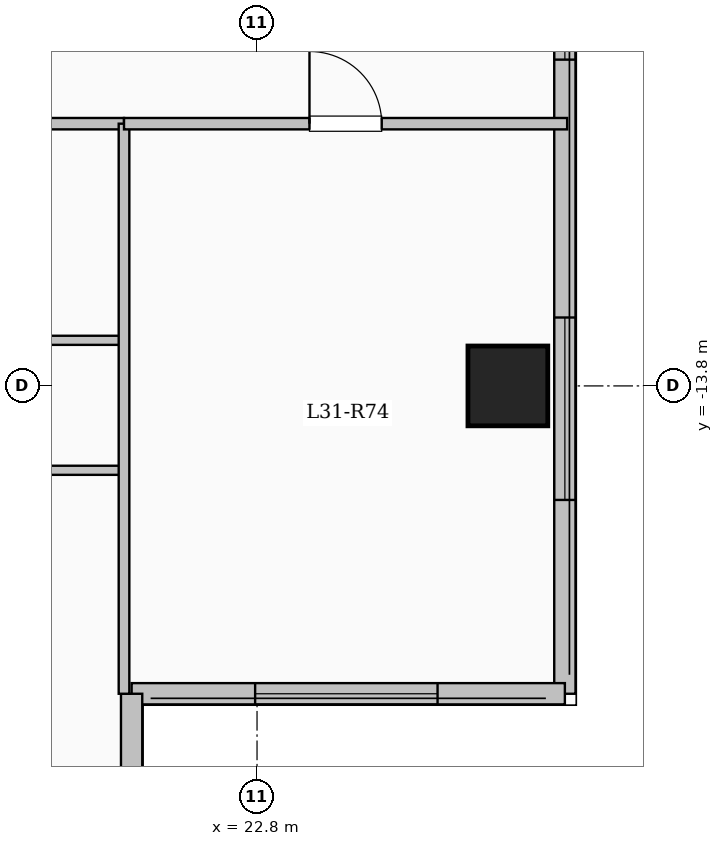
"""IFC4 building model, lengths in metres.
Left out: names, types, materials, properties, quantities, classifications, styles, units other than length and angle.
Written with IfcOpenShell. Run it as: python <this file> out.ifc"""

import sys

from ifc_helpers import new_model, si_unit, direction, frame, frame_2d, origin, origin_2d, place, context, subcontext, project, spatial, rectangle, extrude, element, fill, save


model = new_model("IFC4")
c1 = context("Model", 3, precision=1e-05, world=origin(), true_north=direction((0.0, 1.0)))
c2 = subcontext(c1, "Body", "Model", "MODEL_VIEW")
j1 = project(units=[si_unit("LENGTHUNIT", "METRE"), si_unit("PLANEANGLEUNIT", "RADIAN")], contexts=[c1])
p1 = place(None, origin())
s1 = spatial("IfcSite", under=j1, at=p1, CompositionType="ELEMENT")
p2 = place(p1, origin())
s2 = spatial("IfcBuilding", under=s1, at=p2, CompositionType="ELEMENT")
p3 = place(p2, frame((0.0, 0.0, 115.15)))
s3 = spatial("IfcBuildingStorey", under=s2, at=p3, CompositionType="ELEMENT", Elevation=115.15)
p4 = place(p3, frame((26.1, -13.8, 0.0), z_axis=(0.0, 0.0, 1.0), x_axis=(1.0, 0.0, 0.0)))
e1 = element("IfcColumn", 1, at=p4, inside=s3, PredefinedType="COLUMN", context=c2, shape_type="SweptSolid", body=[
    extrude(rectangle(XDim=1.05, YDim=1.05, at=origin_2d()), origin(), (0.0, 0.0, 1.0), 3.35),
])
p5 = place(p3, frame((26.85, 17.85, 0.0), z_axis=(0.0, 0.0, 1.0), x_axis=(0.0, -1.0, 0.0)))
e2 = element("IfcWall", 2, at=p5, inside=s3, PredefinedType="SOLIDWALL", context=c2, shape_type="SweptSolid", body=[
    extrude(rectangle(XDim=35.7, YDim=0.28, at=frame_2d((17.85, 0.0))), origin(), (0.0, 0.0, 1.0), 3.05),
])
p6 = place(p5, frame((1.675, 0.0, 0.9)))
e3 = element("IfcOpeningElement", 3, at=p6, cuts=e2, PredefinedType="OPENING", context=c2, shape_type="SweptSolid", body=[
    extrude(rectangle(XDim=2.0, YDim=1.7, at=frame_2d((1.0, 0.85))), frame((0.0, 0.15, 0.0), z_axis=(0.0, -1.0, 0.0), x_axis=(1.0, 0.0, 0.0)), (0.0, 0.0, 1.0), 0.3),
])
p7 = place(p5, frame((5.725, 0.0, 0.95)))
e4 = element("IfcOpeningElement", 4, at=p7, cuts=e2, PredefinedType="OPENING", context=c2, shape_type="SweptSolid", body=[
    extrude(rectangle(XDim=1.0, YDim=1.5, at=frame_2d((0.5, 0.75))), frame((0.0, 0.15, 0.0), z_axis=(0.0, -1.0, 0.0), x_axis=(1.0, 0.0, 0.0)), (0.0, 0.0, 1.0), 0.3),
])
p8 = place(p5, frame((15.1, 0.0, 0.9)))
e5 = element("IfcOpeningElement", 5, at=p8, cuts=e2, PredefinedType="OPENING", context=c2, shape_type="SweptSolid", body=[
    extrude(rectangle(XDim=2.0, YDim=1.7, at=frame_2d((1.0, 0.85))), frame((0.0, 0.15, 0.0), z_axis=(0.0, -1.0, 0.0), x_axis=(1.0, 0.0, 0.0)), (0.0, 0.0, 1.0), 0.3),
])
p9 = place(p5, frame((25.857, 0.0, 0.9)))
e6 = element("IfcOpeningElement", 6, at=p9, cuts=e2, PredefinedType="OPENING", context=c2, shape_type="SweptSolid", body=[
    extrude(rectangle(XDim=1.5, YDim=1.65, at=frame_2d((0.75, 0.825))), frame((0.0, 0.15, 0.0), z_axis=(0.0, -1.0, 0.0), x_axis=(1.0, 0.0, 0.0)), (0.0, 0.0, 1.0), 0.3),
])
p10 = place(p5, frame((30.75, 0.0, 0.9)))
e7 = element("IfcOpeningElement", 7, at=p10, cuts=e2, PredefinedType="OPENING", context=c2, shape_type="SweptSolid", body=[
    extrude(rectangle(XDim=2.4, YDim=1.8, at=frame_2d((1.2, 0.9))), frame((0.0, 0.15, 0.0), z_axis=(0.0, -1.0, 0.0), x_axis=(1.0, 0.0, 0.0)), (0.0, 0.0, 1.0), 0.3),
])
p11 = place(p3, frame((26.85, -17.85, 0.0), z_axis=(0.0, 0.0, 1.0), x_axis=(-1.0, 0.0, 0.0)))
e8 = element("IfcWall", 8, at=p11, inside=s3, PredefinedType="SOLIDWALL", context=c2, shape_type="SweptSolid", body=[
    extrude(rectangle(XDim=5.7, YDim=0.28, at=frame_2d((2.85, 0.0))), origin(), (0.0, 0.0, 1.0), 3.05),
])
p12 = place(p11, frame((1.675, 0.0, 0.9)))
e9 = element("IfcOpeningElement", 9, at=p12, cuts=e8, PredefinedType="OPENING", context=c2, shape_type="SweptSolid", body=[
    extrude(rectangle(XDim=2.4, YDim=1.8, at=frame_2d((1.2, 0.9))), frame((0.0, 0.15, 0.0), z_axis=(0.0, -1.0, 0.0), x_axis=(1.0, 0.0, 0.0)), (0.0, 0.0, 1.0), 0.3),
])
p13 = place(p3, frame((21.15, -17.85, 0.0), z_axis=(0.0, 0.0, 1.0), x_axis=(0.0, -1.0, 0.0)))
e10 = element("IfcWall", 10, at=p13, inside=s3, PredefinedType="SOLIDWALL", context=c2, shape_type="SweptSolid", body=[
    extrude(rectangle(XDim=4.2, YDim=0.28, at=frame_2d((2.1, 0.0))), origin(), (0.0, 0.0, 1.0), 3.05),
])
p14 = place(p13, frame((1.182, 0.0, 0.9)))
e11 = element("IfcOpeningElement", 11, at=p14, cuts=e10, PredefinedType="OPENING", context=c2, shape_type="SweptSolid", body=[
    extrude(rectangle(XDim=1.8, YDim=1.65, at=frame_2d((0.9, 0.825))), frame((0.0, 0.15, 0.0), z_axis=(0.0, -1.0, 0.0), x_axis=(1.0, 0.0, 0.0)), (0.0, 0.0, 1.0), 0.3),
])
p15 = place(p3, frame((8.55, -10.35, 0.0), z_axis=(0.0, 0.0, 1.0), x_axis=(1.0, 0.0, 0.0)))
e12 = element("IfcWall", 12, at=p15, inside=s3, PredefinedType="PARTITIONING", context=c2, shape_type="SweptSolid", body=[
    extrude(rectangle(XDim=12.5, YDim=0.15, at=frame_2d((6.25, 0.0))), origin(), (0.0, 0.0, 1.0), 3.05),
])
p16 = place(p15, frame((0.75, 0.0, 0.0)))
e13 = element("IfcOpeningElement", 13, at=p16, cuts=e12, PredefinedType="OPENING", context=c2, shape_type="SweptSolid", body=[
    extrude(rectangle(XDim=0.96, YDim=2.15, at=frame_2d((0.48, 1.075))), frame((0.0, 0.085, 0.0), z_axis=(0.0, -1.0, 0.0), x_axis=(1.0, 0.0, 0.0)), (0.0, 0.0, 1.0), 0.17),
])
p17 = place(p3, frame((17.217, -13.2, 0.0), z_axis=(0.0, 0.0, 1.0), x_axis=(1.0, 0.0, 0.0)))
e14 = element("IfcWall", 14, at=p17, inside=s3, PredefinedType="PARTITIONING", context=c2, shape_type="SweptSolid", body=[
    extrude(rectangle(XDim=3.833, YDim=0.12, at=frame_2d((1.917, 0.0))), origin(), (0.0, 0.0, 1.0), 3.05),
])
p18 = place(p17, frame((1.477, 0.0, 0.0)))
e15 = element("IfcOpeningElement", 15, at=p18, cuts=e14, PredefinedType="OPENING", context=c2, shape_type="SweptSolid", body=[
    extrude(rectangle(XDim=0.88, YDim=2.1, at=frame_2d((0.44, 1.05))), frame((0.0, 0.07, 0.0), z_axis=(0.0, -1.0, 0.0), x_axis=(1.0, 0.0, 0.0)), (0.0, 0.0, 1.0), 0.14),
])
p19 = place(p3, frame((13.532, -14.91, 0.0), z_axis=(0.0, 0.0, 1.0), x_axis=(1.0, 0.0, 0.0)))
e16 = element("IfcWall", 16, at=p19, inside=s3, PredefinedType="PARTITIONING", context=c2, shape_type="SweptSolid", body=[
    extrude(rectangle(XDim=7.578, YDim=0.12, at=frame_2d((3.789, 0.0))), origin(), (0.0, 0.0, 1.0), 3.05),
])
p20 = place(p19, frame((1.41, 0.0, 0.0)))
e17 = element("IfcOpeningElement", 17, at=p20, cuts=e16, PredefinedType="OPENING", context=c2, shape_type="SweptSolid", body=[
    extrude(rectangle(XDim=0.88, YDim=2.1, at=frame_2d((0.44, 1.05))), frame((0.0, 0.07, 0.0), z_axis=(0.0, -1.0, 0.0), x_axis=(1.0, 0.0, 0.0)), (0.0, 0.0, 1.0), 0.14),
])
p21 = place(p19, frame((5.109, 0.0, 0.0)))
e18 = element("IfcOpeningElement", 18, at=p21, cuts=e16, PredefinedType="OPENING", context=c2, shape_type="SweptSolid", body=[
    extrude(rectangle(XDim=0.88, YDim=2.1, at=frame_2d((0.44, 1.05))), frame((0.0, 0.07, 0.0), z_axis=(0.0, -1.0, 0.0), x_axis=(1.0, 0.0, 0.0)), (0.0, 0.0, 1.0), 0.14),
])
p22 = place(p3, frame((21.05, -17.85, 0.0), z_axis=(0.0, 0.0, 1.0), x_axis=(0.0, 1.0, 0.0)))
e19 = element("IfcWall", 19, at=p22, inside=s3, PredefinedType="PARTITIONING", context=c2, shape_type="SweptSolid", body=[
    extrude(rectangle(XDim=7.5, YDim=0.14, at=frame_2d((3.75, 0.0))), origin(), (0.0, 0.0, 1.0), 3.05),
])
p23 = place(p3, frame((21.05, -10.35, 0.0), z_axis=(0.0, 0.0, 1.0), x_axis=(1.0, 0.0, 0.0)))
e20 = element("IfcWall", 20, at=p23, inside=s3, PredefinedType="PARTITIONING", context=c2, shape_type="SweptSolid", body=[
    extrude(rectangle(XDim=5.83, YDim=0.15, at=frame_2d((2.915, 0.0))), origin(), (0.0, 0.0, 1.0), 3.05),
])
p24 = place(p23, frame((2.44, 0.0, 0.0)))
e21 = element("IfcOpeningElement", 21, at=p24, cuts=e20, PredefinedType="OPENING", context=c2, shape_type="SweptSolid", body=[
    extrude(rectangle(XDim=0.95, YDim=2.15, at=frame_2d((0.475, 1.075))), frame((0.0, 0.085, 0.0), z_axis=(0.0, -1.0, 0.0), x_axis=(1.0, 0.0, 0.0)), (0.0, 0.0, 1.0), 0.17),
])
p25 = place(p9, origin())
e22 = element("IfcWindow", 22, at=p25, inside=s3, PartitioningType="SINGLE_PANEL", PredefinedType="WINDOW", context=c2, shape_type="SweptSolid", body=[
    extrude(rectangle(XDim=1.5, YDim=1.65, at=frame_2d((0.75, 0.825))), frame((0.0, 0.03, 0.0), z_axis=(0.0, -1.0, 0.0), x_axis=(1.0, 0.0, 0.0)), (0.0, 0.0, 1.0), 0.06),
])
fill(e6, e22)
p26 = place(p10, origin())
e23 = element("IfcWindow", 23, at=p26, inside=s3, PartitioningType="SINGLE_PANEL", PredefinedType="WINDOW", context=c2, shape_type="SweptSolid", body=[
    extrude(rectangle(XDim=2.4, YDim=1.8, at=frame_2d((1.2, 0.9))), frame((0.0, 0.03, 0.0), z_axis=(0.0, -1.0, 0.0), x_axis=(1.0, 0.0, 0.0)), (0.0, 0.0, 1.0), 0.06),
])
fill(e7, e23)
p27 = place(p12, origin())
e24 = element("IfcWindow", 24, at=p27, inside=s3, PartitioningType="SINGLE_PANEL", PredefinedType="WINDOW", context=c2, shape_type="SweptSolid", body=[
    extrude(rectangle(XDim=2.4, YDim=1.8, at=frame_2d((1.2, 0.9))), frame((0.0, 0.03, 0.0), z_axis=(0.0, -1.0, 0.0), x_axis=(1.0, 0.0, 0.0)), (0.0, 0.0, 1.0), 0.06),
])
fill(e9, e24)
p28 = place(p24, origin())
e25 = element("IfcDoor", 25, at=p28, inside=s3, OperationType="SINGLE_SWING_LEFT", PredefinedType="DOOR", context=c2, shape_type="SweptSolid", body=[
    extrude(rectangle(XDim=0.95, YDim=2.15, at=frame_2d((0.475, 1.075))), frame((0.0, 0.025, 0.0), z_axis=(0.0, -1.0, 0.0), x_axis=(1.0, 0.0, 0.0)), (0.0, 0.0, 1.0), 0.05),
])
fill(e21, e25)
save(model, sys.argv[1])
